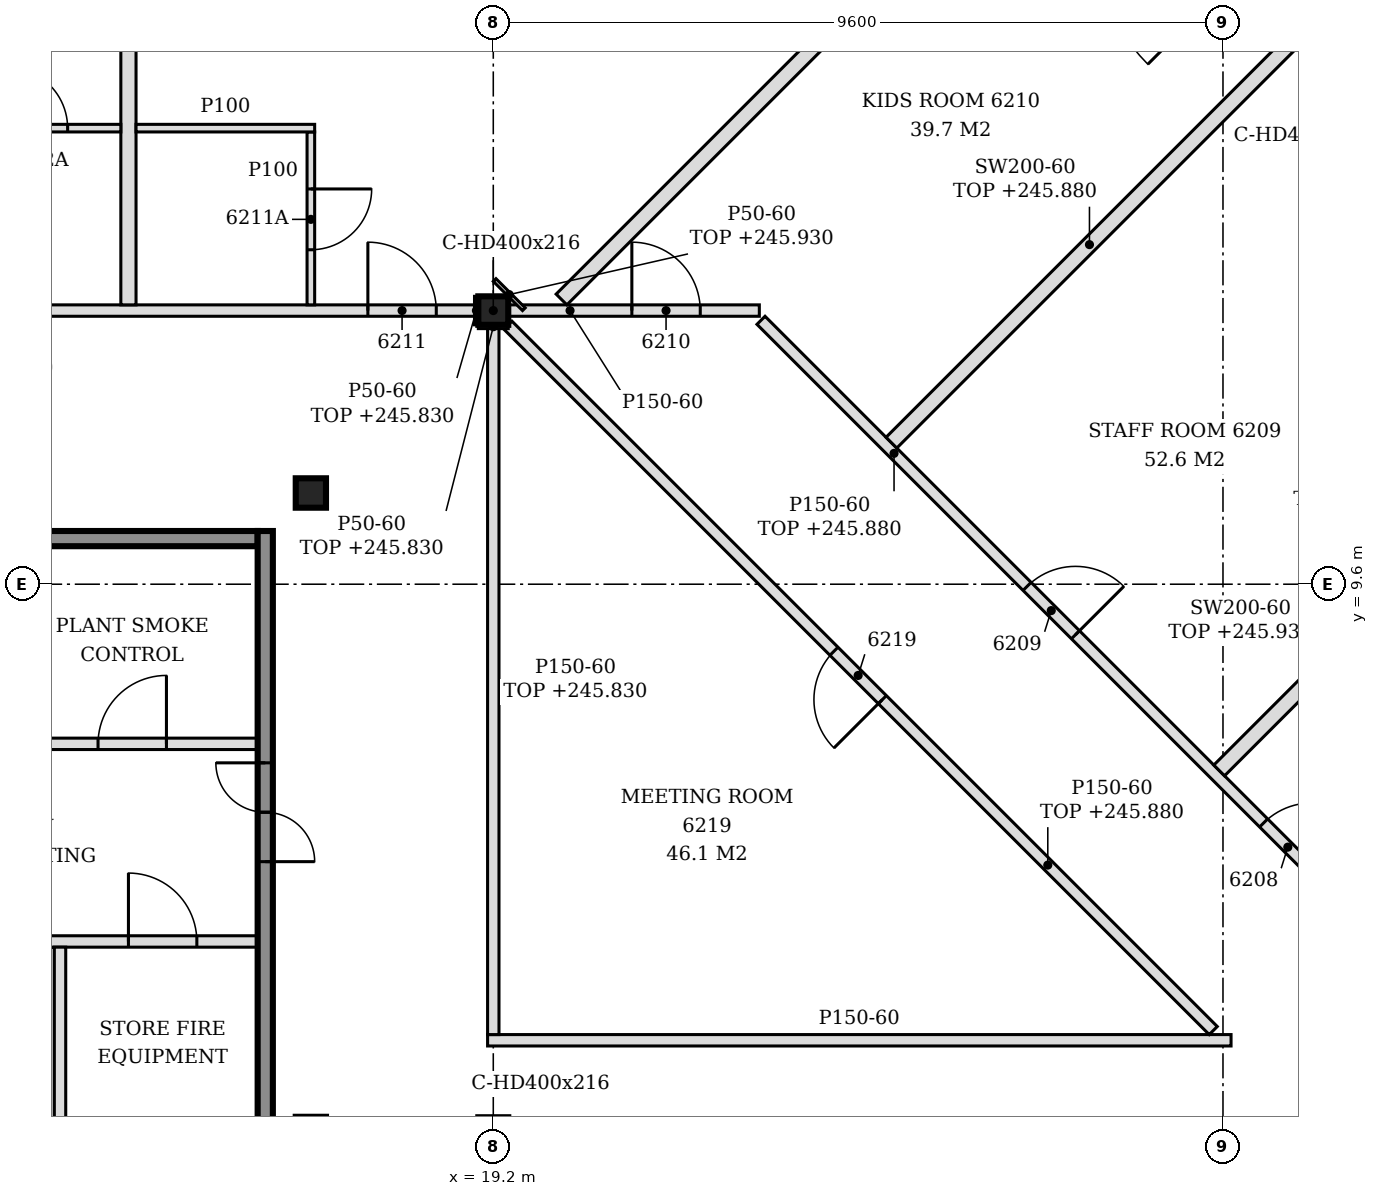
"""IFC4 building model, lengths in metres.
Left out: names, types, materials, properties, quantities, classifications, styles, units other than length and angle.
Written with IfcOpenShell. Run it as: python <this file> out.ifc"""

import sys

from ifc_helpers import new_model, si_unit, direction, frame, frame_2d, origin, origin_2d, place, context, subcontext, project, spatial, polyline, rectangle, i_section, outline, extrude, element, fill, save


model = new_model("IFC4")
c1 = context("Model", 3, precision=1e-05, world=origin(), true_north=direction((0.0, 1.0)))
c2 = subcontext(c1, "Body", "Model", "MODEL_VIEW")
j1 = project(units=[si_unit("LENGTHUNIT", "METRE"), si_unit("PLANEANGLEUNIT", "RADIAN")], contexts=[c1])
p1 = place(None, origin())
s1 = spatial("IfcSite", under=j1, at=p1, CompositionType="ELEMENT")
p2 = place(p1, origin())
s2 = spatial("IfcBuilding", under=s1, at=p2, CompositionType="ELEMENT")
p3 = place(p2, frame((0.0, 0.0, 243.0)))
s3 = spatial("IfcBuildingStorey", under=s2, at=p3, CompositionType="ELEMENT", Elevation=243.0)
p4 = place(p3, frame((19.2, 13.2, -0.15), z_axis=(0.0, 0.0, 1.0), x_axis=(1.0, 0.0, 0.0)))
e1 = element("IfcColumn", 1, at=p4, inside=s3, PredefinedType="COLUMN", context=c2, shape_type="SweptSolid", body=[
    extrude(i_section(OverallWidth=0.394, OverallDepth=0.375, WebThickness=0.017, FlangeThickness=0.028, FilletRadius=0.015, at=origin_2d()), origin(), (0.0, 0.0, 1.0), 3.6),
])
p5 = place(p3, frame((16.8, 10.8, -0.15), z_axis=(0.0, 0.0, 1.0), x_axis=(1.0, 0.0, 0.0)))
e2 = element("IfcColumn", 2, at=p5, inside=s3, PredefinedType="COLUMN", context=c2, shape_type="SweptSolid", body=[
    extrude(i_section(OverallWidth=0.398, OverallDepth=0.387, WebThickness=0.021, FlangeThickness=0.033, FilletRadius=0.015, at=origin_2d()), origin(), (0.0, 0.0, 1.0), 3.6),
])
p6 = place(p3, frame((9.7, 4.9, 0.0), z_axis=(0.0, 0.0, 1.0), x_axis=(1.0, 0.0, 0.0)))
e3 = element("IfcWall", 3, at=p6, inside=s3, PredefinedType="SOLIDWALL", context=c2, shape_type="SweptSolid", body=[
    extrude(rectangle(XDim=6.4, YDim=0.15, at=frame_2d((3.2, 0.0))), origin(), (0.0, 0.0, 1.0), 3.45),
])
p7 = place(p6, frame((0.45, 0.0, 0.0)))
e4 = element("IfcOpeningElement", 4, at=p7, cuts=e3, PredefinedType="OPENING", context=c2, shape_type="SweptSolid", body=[
    extrude(rectangle(XDim=1.0, YDim=2.1, at=frame_2d((0.5, 1.05))), frame((0.0, 0.085, 0.0), z_axis=(0.0, -1.0, 0.0), x_axis=(1.0, 0.0, 0.0)), (0.0, 0.0, 1.0), 0.17),
])
p8 = place(p6, frame((2.35, 0.0, 0.0)))
e5 = element("IfcOpeningElement", 5, at=p8, cuts=e3, PredefinedType="OPENING", context=c2, shape_type="SweptSolid", body=[
    extrude(rectangle(XDim=1.0, YDim=2.1, at=frame_2d((0.5, 1.05))), frame((0.0, 0.085, 0.0), z_axis=(0.0, -1.0, 0.0), x_axis=(1.0, 0.0, 0.0)), (0.0, 0.0, 1.0), 0.17),
])
p9 = place(p6, frame((4.7, 0.0, 0.0)))
e6 = element("IfcOpeningElement", 6, at=p9, cuts=e3, PredefinedType="OPENING", context=c2, shape_type="SweptSolid", body=[
    extrude(rectangle(XDim=0.9, YDim=2.1, at=frame_2d((0.45, 1.05))), frame((0.0, 0.085, 0.0), z_axis=(0.0, -1.0, 0.0), x_axis=(1.0, 0.0, 0.0)), (0.0, 0.0, 1.0), 0.17),
])
p10 = place(p3, frame((12.7, 7.5, 0.0), z_axis=(0.0, 0.0, 1.0), x_axis=(1.0, 0.0, 0.0)))
e7 = element("IfcWall", 7, at=p10, inside=s3, PredefinedType="SOLIDWALL", context=c2, shape_type="SweptSolid", body=[
    extrude(rectangle(XDim=3.4, YDim=0.15, at=frame_2d((1.7, 0.0))), origin(), (0.0, 0.0, 1.0), 3.45),
])
p11 = place(p10, frame((1.3, 0.0, 0.0)))
e8 = element("IfcOpeningElement", 8, at=p11, cuts=e7, PredefinedType="OPENING", context=c2, shape_type="SweptSolid", body=[
    extrude(rectangle(XDim=0.9, YDim=2.1, at=frame_2d((0.45, 1.05))), frame((0.0, 0.085, 0.0), z_axis=(0.0, -1.0, 0.0), x_axis=(1.0, 0.0, 0.0)), (0.0, 0.0, 1.0), 0.17),
])
p12 = place(p3, frame((12.7, 10.2, 0.0), z_axis=(0.0, 0.0, 1.0), x_axis=(1.0, 0.0, 0.0)))
e9 = element("IfcWall", 9, at=p12, inside=s3, PredefinedType="SOLIDWALL", context=c2, shape_type="SweptSolid", body=[
    extrude(rectangle(XDim=3.4, YDim=0.2, at=frame_2d((1.7, 0.0))), origin(), (0.0, 0.0, 1.0), 3.45),
])
p13 = place(p3, frame((13.5, 2.275, 0.0), z_axis=(0.0, 0.0, 1.0), x_axis=(0.0, 1.0, 0.0)))
e10 = element("IfcWall", 10, at=p13, inside=s3, PredefinedType="SOLIDWALL", context=c2, shape_type="SweptSolid", body=[
    extrude(rectangle(XDim=2.55, YDim=0.15, at=frame_2d((1.275, 0.0))), origin(), (0.0, 0.0, 1.0), 3.45),
])
p14 = place(p3, frame((16.2, -5.5, 0.0), z_axis=(0.0, 0.0, 1.0), x_axis=(0.0, 1.0, 0.0)))
e11 = element("IfcWall", 11, at=p14, inside=s3, PredefinedType="SOLIDWALL", context=c2, shape_type="SweptSolid", body=[
    extrude(rectangle(XDim=15.8, YDim=0.2, at=frame_2d((7.9, 0.0))), origin(), (0.0, 0.0, 1.0), 3.45),
])
p15 = place(p14, frame((3.05, 0.0, 0.0)))
e12 = element("IfcOpeningElement", 12, at=p15, cuts=e11, PredefinedType="OPENING", context=c2, shape_type="SweptSolid", body=[
    extrude(rectangle(XDim=1.3, YDim=2.1, at=frame_2d((0.65, 1.05))), frame((0.0, 0.11, 0.0), z_axis=(0.0, -1.0, 0.0), x_axis=(1.0, 0.0, 0.0)), (0.0, 0.0, 1.0), 0.22),
])
p16 = place(p14, frame((11.45, 0.0, 0.0)))
e13 = element("IfcOpeningElement", 13, at=p16, cuts=e11, PredefinedType="OPENING", context=c2, shape_type="SweptSolid", body=[
    extrude(rectangle(XDim=1.3, YDim=2.1, at=frame_2d((0.65, 1.05))), frame((0.0, 0.11, 0.0), z_axis=(0.0, -1.0, 0.0), x_axis=(1.0, 0.0, 0.0)), (0.0, 0.0, 1.0), 0.22),
])
p17 = place(p3, frame((34.8, 0.994, 0.0), z_axis=(0.0, 0.0, 1.0), x_axis=(-0.707099634543, 0.707113927758, 0.0)))
e14 = element("IfcWall", 14, at=p17, inside=s3, PredefinedType="PARTITIONING", context=c2, shape_type="SweptSolid", body=[
    extrude(rectangle(XDim=17.081, YDim=0.15, at=frame_2d((8.541, 0.0))), origin(), (0.0, 0.0, 1.0), 2.88),
])
p18 = place(p17, frame((3.276, 0.0, 0.0)))
e15 = element("IfcOpeningElement", 15, at=p18, cuts=e14, PredefinedType="OPENING", context=c2, shape_type="SweptSolid", body=[
    extrude(rectangle(XDim=0.9, YDim=2.1, at=frame_2d((0.45, 1.05))), frame((0.0, 0.085, 0.0), z_axis=(0.0, -1.0, 0.0), x_axis=(1.0, 0.0, 0.0)), (0.0, 0.0, 1.0), 0.17),
])
p19 = place(p17, frame((6.829, 0.0, 0.0)))
e16 = element("IfcOpeningElement", 16, at=p19, cuts=e14, PredefinedType="OPENING", context=c2, shape_type="SweptSolid", body=[
    extrude(rectangle(XDim=0.9, YDim=2.1, at=frame_2d((0.45, 1.05))), frame((0.0, 0.085, 0.0), z_axis=(0.0, -1.0, 0.0), x_axis=(1.0, 0.0, 0.0)), (0.0, 0.0, 1.0), 0.17),
])
p20 = place(p17, frame((11.23, 0.0, 0.0)))
e17 = element("IfcOpeningElement", 17, at=p20, cuts=e14, PredefinedType="OPENING", context=c2, shape_type="SweptSolid", body=[
    extrude(rectangle(XDim=0.9, YDim=2.1, at=frame_2d((0.45, 1.05))), frame((0.0, 0.085, 0.0), z_axis=(0.0, -1.0, 0.0), x_axis=(1.0, 0.0, 0.0)), (0.0, 0.0, 1.0), 0.17),
])
p21 = place(p3, frame((19.125, 3.6, 0.0), z_axis=(0.0, 0.0, 1.0), x_axis=(1.0, 0.0, 0.0)))
e18 = element("IfcWall", 18, at=p21, inside=s3, PredefinedType="PARTITIONING", context=c2, shape_type="SweptSolid", body=[
    extrude(outline(polyline([(0.0, 0.0), (9.781, 0.0), (9.781, 3.45), (0.225, 3.45), (0.223, 2.83), (0.0, 2.83), (0.0, 0.0)])), frame((0.0, 0.075, 0.0), z_axis=(0.0, -1.0, 0.0), x_axis=(1.0, 0.0, 0.0)), (0.0, 0.0, 1.0), 0.15),
])
p22 = place(p3, frame((19.2, 3.675, 0.0), z_axis=(0.0, 0.0, 1.0), x_axis=(0.0, 1.0, 0.0)))
e19 = element("IfcWall", 19, at=p22, inside=s3, PredefinedType="PARTITIONING", context=c2, shape_type="SweptSolid", body=[
    extrude(rectangle(XDim=9.337, YDim=0.15, at=frame_2d((4.669, 0.0))), origin(), (0.0, 0.0, 1.0), 2.83),
])
p23 = place(p3, frame((28.672, 3.728, 0.0), z_axis=(0.0, 0.0, 1.0), x_axis=(-0.707106781187, 0.707106781187, 0.0)))
e20 = element("IfcWall", 20, at=p23, inside=s3, PredefinedType="PARTITIONING", context=c2, shape_type="SweptSolid", body=[
    extrude(rectangle(XDim=13.124, YDim=0.15, at=frame_2d((6.562, 0.0))), origin(), (0.0, 0.0, 1.0), 2.88),
])
p24 = place(p23, frame((6.157, 0.0, 0.0)))
e21 = element("IfcOpeningElement", 21, at=p24, cuts=e20, PredefinedType="OPENING", context=c2, shape_type="SweptSolid", body=[
    extrude(rectangle(XDim=0.9, YDim=2.1, at=frame_2d((0.45, 1.05))), frame((0.0, 0.085, 0.0), z_axis=(0.0, -1.0, 0.0), x_axis=(1.0, 0.0, 0.0)), (0.0, 0.0, 1.0), 0.17),
])
p25 = place(p3, frame((28.75, 7.15, 0.0), z_axis=(0.0, 0.0, 1.0), x_axis=(0.7070684525, 0.707145107796, 0.0)))
e22 = element("IfcWall", 22, at=p25, inside=s3, PredefinedType="PARTITIONING", context=c2, shape_type="SweptSolid", body=[
    extrude(rectangle(XDim=3.185, YDim=0.2, at=frame_2d((1.592, 0.0))), origin(), (0.0, 0.0, 1.0), 2.93),
])
p26 = place(p3, frame((24.438, 11.462, 0.0), z_axis=(0.0, 0.0, 1.0), x_axis=(0.707090216072, 0.707123345913, 0.0)))
e23 = element("IfcWall", 23, at=p26, inside=s3, PredefinedType="PARTITIONING", context=c2, shape_type="SweptSolid", body=[
    extrude(rectangle(XDim=7.369, YDim=0.2, at=frame_2d((3.685, 0.0))), origin(), (0.0, 0.0, 1.0), 2.88),
])
p27 = place(p3, frame((7.397, 13.2, 0.0), z_axis=(0.0, 0.0, 1.0), x_axis=(1.0, 0.0, 0.0)))
e24 = element("IfcWall", 24, at=p27, inside=s3, PredefinedType="PARTITIONING", context=c2, shape_type="SweptSolid", body=[
    extrude(rectangle(XDim=11.606, YDim=0.15, at=frame_2d((5.803, 0.0))), origin(), (0.0, 0.0, 1.0), 2.83),
])
p28 = place(p27, frame((10.153, 0.0, 0.0)))
e25 = element("IfcOpeningElement", 25, at=p28, cuts=e24, PredefinedType="OPENING", context=c2, shape_type="SweptSolid", body=[
    extrude(rectangle(XDim=0.9, YDim=2.1, at=frame_2d((0.45, 1.05))), frame((0.0, 0.085, 0.0), z_axis=(0.0, -1.0, 0.0), x_axis=(1.0, 0.0, 0.0)), (0.0, 0.0, 1.0), 0.17),
])
p29 = place(p3, frame((19.397, 13.2, 0.0), z_axis=(0.0, 0.0, 1.0), x_axis=(1.0, 0.0, 0.0)))
e26 = element("IfcWall", 26, at=p29, inside=s3, PredefinedType="PARTITIONING", context=c2, shape_type="SweptSolid", body=[
    extrude(rectangle(XDim=3.303, YDim=0.15, at=frame_2d((1.652, 0.0))), origin(), (0.0, 0.0, 1.0), 3.45),
])
p30 = place(p29, frame((1.626, 0.0, 0.0)))
e27 = element("IfcOpeningElement", 27, at=p30, cuts=e26, PredefinedType="OPENING", context=c2, shape_type="SweptSolid", body=[
    extrude(rectangle(XDim=0.9, YDim=2.1, at=frame_2d((0.45, 1.05))), frame((0.0, 0.085, 0.0), z_axis=(0.0, -1.0, 0.0), x_axis=(1.0, 0.0, 0.0)), (0.0, 0.0, 1.0), 0.17),
])
p31 = place(p3, frame((14.4, 13.275, 0.0), z_axis=(0.0, 0.0, 1.0), x_axis=(0.0, 1.0, 0.0)))
e28 = element("IfcWall", 28, at=p31, inside=s3, PredefinedType="PARTITIONING", context=c2, shape_type="SweptSolid", body=[
    extrude(outline(polyline([(0.0, 0.0), (9.622, 0.0), (9.622, 3.45), (6.03, 3.45), (6.028, 2.88), (5.82, 2.88), (5.818, 3.45), (0.075, 3.45), (0.073, 2.83), (0.0, 2.83), (0.0, 0.0)])), frame((0.0, 0.1, 0.0), z_axis=(0.0, -1.0, 0.0), x_axis=(1.0, 0.0, 0.0)), (0.0, 0.0, 1.0), 0.2),
])
p32 = place(p3, frame((16.8, 13.275, 0.0), z_axis=(0.0, 0.0, 1.0), x_axis=(0.0, 1.0, 0.0)))
e29 = element("IfcWall", 29, at=p32, inside=s3, PredefinedType="PARTITIONING", context=c2, shape_type="SweptSolid", body=[
    extrude(outline(polyline([(0.0, 0.0), (2.275, 0.0), (2.275, 3.45), (0.075, 3.45), (0.073, 2.83), (0.0, 2.83), (0.0, 0.0)])), frame((0.0, 0.05, 0.0), z_axis=(0.0, -1.0, 0.0), x_axis=(1.0, 0.0, 0.0)), (0.0, 0.0, 1.0), 0.1),
])
p33 = place(p32, frame((0.725, 0.0, 0.0)))
e30 = element("IfcOpeningElement", 30, at=p33, cuts=e29, PredefinedType="OPENING", context=c2, shape_type="SweptSolid", body=[
    extrude(rectangle(XDim=0.8, YDim=2.1, at=frame_2d((0.4, 1.05))), frame((0.0, 0.06, 0.0), z_axis=(0.0, -1.0, 0.0), x_axis=(1.0, 0.0, 0.0)), (0.0, 0.0, 1.0), 0.12),
])
p34 = place(p3, frame((20.098, 13.346, 0.0), z_axis=(0.0, 0.0, 1.0), x_axis=(0.707119095079, 0.70709446708, 0.0)))
e31 = element("IfcWall", 31, at=p34, inside=s3, PredefinedType="PARTITIONING", context=c2, shape_type="SweptSolid", body=[
    extrude(rectangle(XDim=9.913, YDim=0.2, at=frame_2d((4.957, 0.0))), origin(), (0.0, 0.0, 1.0), 2.88),
])
p35 = place(p3, frame((11.95, 15.6, 0.0), z_axis=(0.0, 0.0, 1.0), x_axis=(1.0, 0.0, 0.0)))
e32 = element("IfcWall", 32, at=p35, inside=s3, PredefinedType="PARTITIONING", context=c2, shape_type="SweptSolid", body=[
    extrude(rectangle(XDim=2.35, YDim=0.1, at=frame_2d((1.175, 0.0))), origin(), (0.0, 0.0, 1.0), 3.45),
])
p36 = place(p35, frame((0.85, 0.0, 0.0)))
e33 = element("IfcOpeningElement", 33, at=p36, cuts=e32, PredefinedType="OPENING", context=c2, shape_type="SweptSolid", body=[
    extrude(rectangle(XDim=0.8, YDim=2.1, at=frame_2d((0.4, 1.05))), frame((0.0, 0.06, 0.0), z_axis=(0.0, -1.0, 0.0), x_axis=(1.0, 0.0, 0.0)), (0.0, 0.0, 1.0), 0.12),
])
p37 = place(p3, frame((14.5, 15.6, 0.0), z_axis=(0.0, 0.0, 1.0), x_axis=(1.0, 0.0, 0.0)))
e34 = element("IfcWall", 34, at=p37, inside=s3, PredefinedType="PARTITIONING", context=c2, shape_type="SweptSolid", body=[
    extrude(rectangle(XDim=2.35, YDim=0.1, at=frame_2d((1.175, 0.0))), origin(), (0.0, 0.0, 1.0), 3.45),
])
p38 = place(p3, frame((18.978, 13.012, 0.0), z_axis=(0.0, 0.0, 1.0), x_axis=(0.0, 1.0, 0.0)))
e35 = element("IfcWall", 35, at=p38, inside=s3, PredefinedType="PARTITIONING", context=c2, shape_type="SweptSolid", body=[
    extrude(rectangle(XDim=0.375, YDim=0.05, at=frame_2d((0.188, 0.0))), origin(), (0.0, 0.0, 1.0), 2.83),
])
p39 = place(p3, frame((19.602, 13.218, 0.0), z_axis=(0.0, 0.0, 1.0), x_axis=(-0.707106781187, 0.707106781187, 0.0)))
e36 = element("IfcWall", 36, at=p39, inside=s3, PredefinedType="PARTITIONING", context=c2, shape_type="SweptSolid", body=[
    extrude(rectangle(XDim=0.544, YDim=0.05, at=frame_2d((0.272, 0.0))), origin(), (0.0, 0.0, 1.0), 2.93),
])
p40 = place(p3, frame((19.003, 12.988, 0.0), z_axis=(0.0, 0.0, 1.0), x_axis=(1.0, 0.0, 0.0)))
e37 = element("IfcWall", 37, at=p40, inside=s3, PredefinedType="PARTITIONING", context=c2, shape_type="SweptSolid", body=[
    extrude(rectangle(XDim=0.394, YDim=0.05, at=frame_2d((0.197, 0.0))), origin(), (0.0, 0.0, 1.0), 2.83),
])
p41 = place(p16, origin())
e38 = element("IfcDoor", 38, at=p41, inside=s3, OperationType="DOUBLE_DOOR_SINGLE_SWING", PredefinedType="DOOR", context=c2, shape_type="SweptSolid", body=[
    extrude(rectangle(XDim=1.3, YDim=2.1, at=frame_2d((0.65, 1.05))), frame((0.0, 0.025, 0.0), z_axis=(0.0, -1.0, 0.0), x_axis=(1.0, 0.0, 0.0)), (0.0, 0.0, 1.0), 0.05),
])
fill(e13, e38)
p42 = place(p9, origin())
e39 = element("IfcDoor", 39, at=p42, inside=s3, OperationType="SINGLE_SWING_LEFT", PredefinedType="DOOR", context=c2, shape_type="SweptSolid", body=[
    extrude(rectangle(XDim=0.9, YDim=2.1, at=frame_2d((0.45, 1.05))), frame((0.0, 0.025, 0.0), z_axis=(0.0, -1.0, 0.0), x_axis=(1.0, 0.0, 0.0)), (0.0, 0.0, 1.0), 0.05),
])
fill(e6, e39)
p43 = place(p11, origin())
e40 = element("IfcDoor", 40, at=p43, inside=s3, OperationType="SINGLE_SWING_RIGHT", PredefinedType="DOOR", context=c2, shape_type="SweptSolid", body=[
    extrude(rectangle(XDim=0.9, YDim=2.1, at=frame_2d((0.45, 1.05))), frame((0.0, 0.025, 0.0), z_axis=(0.0, -1.0, 0.0), x_axis=(1.0, 0.0, 0.0)), (0.0, 0.0, 1.0), 0.05),
])
fill(e8, e40)
p44 = place(p19, frame((0.9, 0.0, 0.0), z_axis=(0.0, 0.0, 1.0), x_axis=(-1.0, 0.0, 0.0)))
e41 = element("IfcDoor", 41, at=p44, inside=s3, OperationType="SINGLE_SWING_RIGHT", PredefinedType="DOOR", context=c2, shape_type="SweptSolid", body=[
    extrude(rectangle(XDim=0.9, YDim=2.1, at=frame_2d((0.45, 1.05))), frame((0.0, 0.025, 0.0), z_axis=(0.0, -1.0, 0.0), x_axis=(1.0, 0.0, 0.0)), (0.0, 0.0, 1.0), 0.05),
])
fill(e16, e41)
p45 = place(p20, frame((0.9, 0.0, 0.0), z_axis=(0.0, 0.0, 1.0), x_axis=(-1.0, 0.0, 0.0)))
e42 = element("IfcDoor", 42, at=p45, inside=s3, OperationType="SINGLE_SWING_RIGHT", PredefinedType="DOOR", context=c2, shape_type="SweptSolid", body=[
    extrude(rectangle(XDim=0.9, YDim=2.1, at=frame_2d((0.45, 1.05))), frame((0.0, 0.025, 0.0), z_axis=(0.0, -1.0, 0.0), x_axis=(1.0, 0.0, 0.0)), (0.0, 0.0, 1.0), 0.05),
])
fill(e17, e42)
p46 = place(p30, origin())
e43 = element("IfcDoor", 43, at=p46, inside=s3, OperationType="SINGLE_SWING_LEFT", PredefinedType="DOOR", context=c2, shape_type="SweptSolid", body=[
    extrude(rectangle(XDim=0.9, YDim=2.1, at=frame_2d((0.45, 1.05))), frame((0.0, 0.025, 0.0), z_axis=(0.0, -1.0, 0.0), x_axis=(1.0, 0.0, 0.0)), (0.0, 0.0, 1.0), 0.05),
])
fill(e27, e43)
p47 = place(p28, origin())
e44 = element("IfcDoor", 44, at=p47, inside=s3, OperationType="SINGLE_SWING_LEFT", PredefinedType="DOOR", context=c2, shape_type="SweptSolid", body=[
    extrude(rectangle(XDim=0.9, YDim=2.1, at=frame_2d((0.45, 1.05))), frame((0.0, 0.025, 0.0), z_axis=(0.0, -1.0, 0.0), x_axis=(1.0, 0.0, 0.0)), (0.0, 0.0, 1.0), 0.05),
])
fill(e25, e44)
p48 = place(p33, frame((0.8, 0.0, 0.0), z_axis=(0.0, 0.0, 1.0), x_axis=(-1.0, 0.0, 0.0)))
e45 = element("IfcDoor", 45, at=p48, inside=s3, OperationType="SINGLE_SWING_LEFT", PredefinedType="DOOR", context=c2, shape_type="SweptSolid", body=[
    extrude(rectangle(XDim=0.8, YDim=2.1, at=frame_2d((0.4, 1.05))), frame((0.0, 0.025, 0.0), z_axis=(0.0, -1.0, 0.0), x_axis=(1.0, 0.0, 0.0)), (0.0, 0.0, 1.0), 0.05),
])
fill(e30, e45)
p49 = place(p36, origin())
e46 = element("IfcDoor", 46, at=p49, inside=s3, OperationType="SINGLE_SWING_LEFT", PredefinedType="DOOR", context=c2, shape_type="SweptSolid", body=[
    extrude(rectangle(XDim=0.8, YDim=2.1, at=frame_2d((0.4, 1.05))), frame((0.0, 0.025, 0.0), z_axis=(0.0, -1.0, 0.0), x_axis=(1.0, 0.0, 0.0)), (0.0, 0.0, 1.0), 0.05),
])
fill(e33, e46)
p50 = place(p24, origin())
e47 = element("IfcDoor", 47, at=p50, inside=s3, OperationType="SINGLE_SWING_LEFT", PredefinedType="DOOR", context=c2, shape_type="SweptSolid", body=[
    extrude(rectangle(XDim=0.9, YDim=2.1, at=frame_2d((0.45, 1.05))), frame((0.0, 0.025, 0.0), z_axis=(0.0, -1.0, 0.0), x_axis=(1.0, 0.0, 0.0)), (0.0, 0.0, 1.0), 0.05),
])
fill(e21, e47)
save(model, sys.argv[1])
